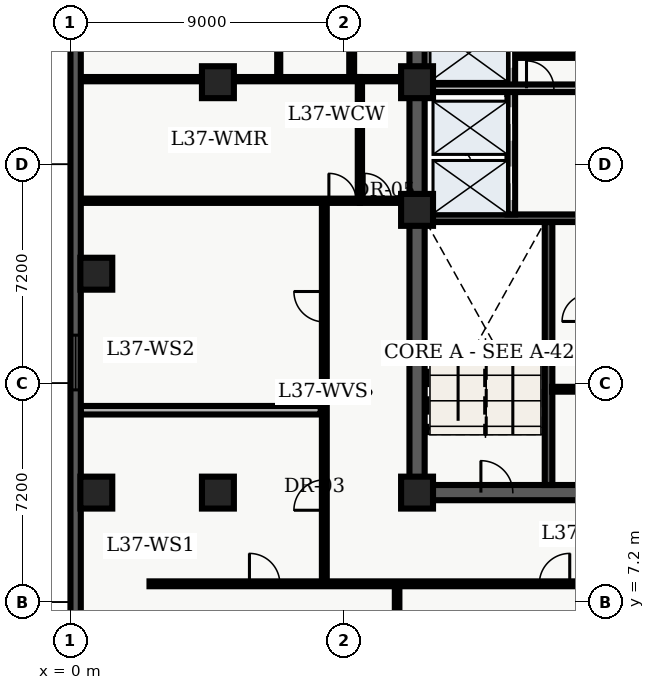
"""IFC4 building model, lengths in metres.
Left out: names, types, materials, properties, quantities, classifications, styles, units other than length and angle.
Written with IfcOpenShell. Run it as: python <this file> out.ifc"""

import sys

from ifc_helpers import new_model, entity, si_unit, converted_unit, direction, frame, origin_with_axes, origin_2d_with_axis, place, context, subcontext, project, spatial, polyline, rectangle, outline, extrude, element, fill, save


model = new_model("IFC4")
c1 = context("Model", 3, precision=1e-05, world=origin_with_axes(), true_north=direction((0.0, 1.0)))
c2 = subcontext(c1, "Body", "Model", "MODEL_VIEW")
j1 = project(units=[si_unit("LENGTHUNIT", "METRE"), converted_unit("PLANEANGLEUNIT", "DEGREE", entity("IfcPlaneAngleMeasure", 0.017), si_unit("PLANEANGLEUNIT", "RADIAN"), dimensions=[0, 0, 0, 0, 0, 0, 0])], contexts=[c1])
p1 = place(None, origin_with_axes())
s1 = spatial("IfcSite", under=j1, at=p1, CompositionType="ELEMENT")
p2 = place(p1, origin_with_axes())
s2 = spatial("IfcBuilding", under=s1, at=p2, CompositionType="ELEMENT")
p3 = place(p2, frame((0.0, 0.0, 152.4), z_axis=(0.0, 0.0, 1.0), x_axis=(1.0, 0.0, 0.0)))
s3 = spatial("IfcBuildingStorey", under=s2, at=p3, CompositionType="ELEMENT", Elevation=152.4)
p4 = place(p3, frame((11.4, 10.8, 0.0), z_axis=(0.0, 0.0, 1.0), x_axis=(0.0, 1.0, 0.0)))
e1 = element("IfcWall", 1, at=p4, inside=s3, PredefinedType="SHEAR", context=c2, shape_type="SweptSolid", body=[
    extrude(outline(polyline([(0.0, -0.25), (27.0, -0.25), (27.0, 0.25), (0.0, 0.25), (0.0, -0.25)])), origin_with_axes(), (0.0, 0.0, 1.0), 3.66),
])
p5 = place(p3, frame((11.4, 10.8, 0.0), z_axis=(0.0, 0.0, 1.0), x_axis=(1.0, 0.0, 0.0)))
e2 = element("IfcWall", 2, at=p5, inside=s3, PredefinedType="SHEAR", context=c2, shape_type="SweptSolid", body=[
    extrude(outline(polyline([(0.0, -0.25), (7.2, -0.25), (7.2, 0.25), (0.0, 0.25), (0.0, -0.25)])), origin_with_axes(), (0.0, 0.0, 1.0), 3.66),
])
p6 = place(p5, frame((2.625, 0.0, 0.0), z_axis=(0.0, 0.0, 1.0), x_axis=(1.0, 0.0, 0.0)))
e3 = element("IfcOpeningElement", 3, at=p6, cuts=e2, PredefinedType="OPENING", context=c2, shape_type="SweptSolid", body=[
    extrude(rectangle(XDim=1.05, YDim=0.52, at=origin_2d_with_axis()), origin_with_axes(), (0.0, 0.0, 1.0), 2.15),
])
p7 = place(p3, frame((15.725, 11.05, 0.0), z_axis=(0.0, 0.0, 1.0), x_axis=(0.0, 1.0, 0.0)))
e4 = element("IfcWall", 4, at=p7, inside=s3, PredefinedType="SHEAR", context=c2, shape_type="SweptSolid", body=[
    extrude(outline(polyline([(0.0, -0.125), (8.65, -0.125), (8.65, 0.125), (0.0, 0.125), (0.0, -0.125)])), origin_with_axes(), (0.0, 0.0, 1.0), 3.66),
])
p8 = place(p3, frame((11.65, 19.825, 0.0), z_axis=(0.0, 0.0, 1.0), x_axis=(1.0, 0.0, 0.0)))
e5 = element("IfcWall", 5, at=p8, inside=s3, PredefinedType="SHEAR", context=c2, shape_type="SweptSolid", body=[
    extrude(outline(polyline([(0.0, -0.125), (6.7, -0.125), (6.7, 0.125), (0.0, 0.125), (0.0, -0.125)])), origin_with_axes(), (0.0, 0.0, 1.0), 3.66),
])
p9 = place(p3, frame((14.5, 19.95, 0.0), z_axis=(0.0, 0.0, 1.0), x_axis=(0.0, 1.0, 0.0)))
e6 = element("IfcWall", 6, at=p9, inside=s3, PredefinedType="SOLIDWALL", context=c2, shape_type="SweptSolid", body=[
    extrude(outline(polyline([(0.0, -0.125), (6.25, -0.125), (6.25, 0.125), (0.0, 0.125), (0.0, -0.125)])), origin_with_axes(), (0.0, 0.0, 1.0), 2.7),
])
p10 = place(p9, frame((1.025, 0.0, 0.0), z_axis=(0.0, 0.0, 1.0), x_axis=(1.0, 0.0, 0.0)))
e7 = element("IfcOpeningElement", 7, at=p10, cuts=e6, PredefinedType="OPENING", context=c2, shape_type="SweptSolid", body=[
    extrude(rectangle(XDim=1.1, YDim=0.27, at=origin_2d_with_axis()), origin_with_axes(), (0.0, 0.0, 1.0), 2.15),
])
p11 = place(p9, frame((2.975, 0.0, 0.0), z_axis=(0.0, 0.0, 1.0), x_axis=(1.0, 0.0, 0.0)))
e8 = element("IfcOpeningElement", 8, at=p11, cuts=e6, PredefinedType="OPENING", context=c2, shape_type="SweptSolid", body=[
    extrude(rectangle(XDim=1.1, YDim=0.27, at=origin_2d_with_axis()), origin_with_axes(), (0.0, 0.0, 1.0), 2.15),
])
p12 = place(p9, frame((5.425, 0.0, 0.0), z_axis=(0.0, 0.0, 1.0), x_axis=(1.0, 0.0, 0.0)))
e9 = element("IfcOpeningElement", 9, at=p12, cuts=e6, PredefinedType="OPENING", context=c2, shape_type="SweptSolid", body=[
    extrude(rectangle(XDim=1.2, YDim=0.27, at=origin_2d_with_axis()), origin_with_axes(), (0.0, 0.0, 1.0), 2.15),
])
p13 = place(p3, frame((11.7, 24.1, 0.0), z_axis=(0.0, 0.0, 1.0), x_axis=(1.0, 0.0, 0.0)))
e10 = element("IfcWall", 10, at=p13, inside=s3, PredefinedType="SOLIDWALL", context=c2, shape_type="SweptSolid", body=[
    extrude(outline(polyline([(0.0, -0.125), (6.6, -0.125), (6.6, 0.125), (0.0, 0.125), (0.0, -0.125)])), origin_with_axes(), (0.0, 0.0, 1.0), 2.7),
])
p14 = place(p13, frame((3.75, 0.0, 0.0), z_axis=(0.0, 0.0, 1.0), x_axis=(1.0, 0.0, 0.0)))
e11 = element("IfcOpeningElement", 11, at=p14, cuts=e10, PredefinedType="OPENING", context=c2, shape_type="SweptSolid", body=[
    extrude(rectangle(XDim=0.9, YDim=0.27, at=origin_2d_with_axis()), origin_with_axes(), (0.0, 0.0, 1.0), 2.15),
])
for number, where, z_axis, x_axis in (
    (12, (11.4, 10.8, 0.0), (0.0, 0.0, 1.0), (1.0, 0.0, 0.0)),
    (13, (11.4, 20.1, 0.0), (0.0, 0.0, 1.0), (1.0, 0.0, 0.0)),
    (14, (11.4, 24.3, 0.0), (0.0, 0.0, 1.0), (1.0, 0.0, 0.0)),
    (15, (4.85, 10.8, 0.0), (0.0, 0.0, 1.0), (1.0, 0.0, 0.0)),
    (16, (4.85, 24.3, 0.0), (0.0, 0.0, 1.0), (1.0, 0.0, 0.0)),
    (17, (0.85, 10.8, 0.0), (0.0, 0.0, 1.0), (1.0, 0.0, 0.0)),
    (18, (0.85, 18.0, 0.0), (0.0, 0.0, 1.0), (1.0, 0.0, 0.0)),
):
    element("IfcColumn", number, at=place(p3, frame(where, z_axis=z_axis, x_axis=x_axis)), inside=s3, PredefinedType="COLUMN", context=c2, shape_type="SweptSolid", body=[
        extrude(rectangle(XDim=1.05, YDim=1.05, at=origin_2d_with_axis()), origin_with_axes(), (0.0, 0.0, 1.0), 3.9),
    ])
p15 = place(p3, frame((14.62, 25.18, 0.0), z_axis=(0.0, 0.0, 1.0), x_axis=(1.0, 0.0, 0.0)))
e19 = element("IfcWall", 19, at=p15, inside=s3, PredefinedType="PARTITIONING", context=c2, shape_type="SweptSolid", body=[
    extrude(outline(polyline([(0.0, -0.08), (3.68, -0.08), (3.68, 0.08), (0.0, 0.08), (0.0, -0.08)])), origin_with_axes(), (0.0, 0.0, 1.0), 2.7),
])
p16 = place(p15, frame((1.95, 0.0, 0.0), z_axis=(0.0, 0.0, 1.0), x_axis=(1.0, 0.0, 0.0)))
e20 = element("IfcOpeningElement", 20, at=p16, cuts=e19, PredefinedType="OPENING", context=c2, shape_type="SweptSolid", body=[
    extrude(rectangle(XDim=0.9, YDim=0.18, at=origin_2d_with_axis()), origin_with_axes(), (0.0, 0.0, 1.0), 2.15),
])
p17 = place(p3, frame((15.84, 14.2, 0.0), z_axis=(0.0, 0.0, 1.0), x_axis=(1.0, 0.0, 0.0)))
e21 = element("IfcWall", 21, at=p17, inside=s3, PredefinedType="PARTITIONING", context=c2, shape_type="SweptSolid", body=[
    extrude(outline(polyline([(0.0, -0.08), (2.46, -0.08), (2.46, 0.08), (0.0, 0.08), (0.0, -0.08)])), origin_with_axes(), (0.0, 0.0, 1.0), 2.7),
])
p18 = place(p3, frame((9.52, 20.4, 0.0), z_axis=(0.0, 0.0, 1.0), x_axis=(0.0, 1.0, 0.0)))
e22 = element("IfcWall", 22, at=p18, inside=s3, PredefinedType="PARTITIONING", context=c2, shape_type="SweptSolid", body=[
    extrude(outline(polyline([(0.0, -0.07), (4.0, -0.07), (4.0, 0.07), (0.0, 0.07), (0.0, -0.07)])), origin_with_axes(), (0.0, 0.0, 1.0), 2.7),
])
p19 = place(p3, frame((9.52, 20.4, 0.0), z_axis=(0.0, 0.0, 1.0), x_axis=(1.0, 0.0, 0.0)))
e23 = element("IfcWall", 23, at=p19, inside=s3, PredefinedType="PARTITIONING", context=c2, shape_type="SweptSolid", body=[
    extrude(outline(polyline([(0.0, -0.07), (1.58, -0.07), (1.58, 0.07), (0.0, 0.07), (0.0, -0.07)])), origin_with_axes(), (0.0, 0.0, 1.0), 2.7),
])
p20 = place(p19, frame((0.59, 0.0, 0.0), z_axis=(0.0, 0.0, 1.0), x_axis=(1.0, 0.0, 0.0)))
e24 = element("IfcOpeningElement", 24, at=p20, cuts=e23, PredefinedType="OPENING", context=c2, shape_type="SweptSolid", body=[
    extrude(rectangle(XDim=0.9, YDim=0.16, at=origin_2d_with_axis()), origin_with_axes(), (0.0, 0.0, 1.0), 2.15),
])
p21 = place(p3, frame((9.52, 24.4, 0.0), z_axis=(0.0, 0.0, 1.0), x_axis=(1.0, 0.0, 0.0)))
e25 = element("IfcWall", 25, at=p21, inside=s3, PredefinedType="PARTITIONING", context=c2, shape_type="SweptSolid", body=[
    extrude(outline(polyline([(0.0, -0.07), (1.58, -0.07), (1.58, 0.07), (0.0, 0.07), (0.0, -0.07)])), origin_with_axes(), (0.0, 0.0, 1.0), 2.7),
])
p22 = place(p3, frame((2.6, 7.8, 0.0), z_axis=(0.0, 0.0, 1.0), x_axis=(1.0, 0.0, 0.0)))
e26 = element("IfcWall", 26, at=p22, inside=s3, PredefinedType="PARTITIONING", context=c2, shape_type="SweptSolid", body=[
    extrude(outline(polyline([(0.0, -0.08), (18.55, -0.08), (18.55, 0.08), (0.0, 0.08), (0.0, -0.08)])), origin_with_axes(), (0.0, 0.0, 1.0), 2.7),
])
p23 = place(p22, frame((3.787, 0.0, 0.0), z_axis=(0.0, 0.0, 1.0), x_axis=(1.0, 0.0, 0.0)))
e27 = element("IfcOpeningElement", 27, at=p23, cuts=e26, PredefinedType="OPENING", context=c2, shape_type="SweptSolid", body=[
    extrude(rectangle(XDim=1.0, YDim=0.18, at=origin_2d_with_axis()), origin_with_axes(), (0.0, 0.0, 1.0), 2.15),
])
p24 = place(p22, frame((13.322, 0.0, 0.0), z_axis=(0.0, 0.0, 1.0), x_axis=(1.0, 0.0, 0.0)))
e28 = element("IfcOpeningElement", 28, at=p24, cuts=e26, PredefinedType="OPENING", context=c2, shape_type="SweptSolid", body=[
    extrude(rectangle(XDim=1.0, YDim=0.18, at=origin_2d_with_axis()), origin_with_axes(), (0.0, 0.0, 1.0), 2.15),
])
p25 = place(p3, frame((8.35, 7.8, 0.0), z_axis=(0.0, 0.0, 1.0), x_axis=(0.0, 1.0, 0.0)))
e29 = element("IfcWall", 29, at=p25, inside=s3, PredefinedType="PARTITIONING", context=c2, shape_type="SweptSolid", body=[
    extrude(outline(polyline([(0.0, -0.08), (12.6, -0.08), (12.6, 0.08), (0.0, 0.08), (0.0, -0.08)])), origin_with_axes(), (0.0, 0.0, 1.0), 2.7),
])
p26 = place(p25, frame((2.92, 0.0, 0.0), z_axis=(0.0, 0.0, 1.0), x_axis=(1.0, 0.0, 0.0)))
e30 = element("IfcOpeningElement", 30, at=p26, cuts=e29, PredefinedType="OPENING", context=c2, shape_type="SweptSolid", body=[
    extrude(rectangle(XDim=1.0, YDim=0.18, at=origin_2d_with_axis()), origin_with_axes(), (0.0, 0.0, 1.0), 2.15),
])
p27 = place(p25, frame((9.115, 0.0, 0.0), z_axis=(0.0, 0.0, 1.0), x_axis=(1.0, 0.0, 0.0)))
e31 = element("IfcOpeningElement", 31, at=p27, cuts=e29, PredefinedType="OPENING", context=c2, shape_type="SweptSolid", body=[
    extrude(rectangle(XDim=1.0, YDim=0.18, at=origin_2d_with_axis()), origin_with_axes(), (0.0, 0.0, 1.0), 2.15),
])
p28 = place(p3, frame((9.25, 24.4, 0.0), z_axis=(0.0, 0.0, 1.0), x_axis=(0.0, 1.0, 0.0)))
e32 = element("IfcWall", 32, at=p28, inside=s3, PredefinedType="PARTITIONING", context=c2, shape_type="SweptSolid", body=[
    extrude(outline(polyline([(0.0, -0.08), (16.1, -0.08), (16.1, 0.08), (0.0, 0.08), (0.0, -0.08)])), origin_with_axes(), (0.0, 0.0, 1.0), 2.7),
])
p29 = place(p28, frame((5.51, 0.0, 0.0), z_axis=(0.0, 0.0, 1.0), x_axis=(1.0, 0.0, 0.0)))
e33 = element("IfcOpeningElement", 33, at=p29, cuts=e32, PredefinedType="OPENING", context=c2, shape_type="SweptSolid", body=[
    extrude(rectangle(XDim=1.0, YDim=0.18, at=origin_2d_with_axis()), origin_with_axes(), (0.0, 0.0, 1.0), 2.15),
])
p30 = place(p28, frame((13.455, 0.0, 0.0), z_axis=(0.0, 0.0, 1.0), x_axis=(1.0, 0.0, 0.0)))
e34 = element("IfcOpeningElement", 34, at=p30, cuts=e32, PredefinedType="OPENING", context=c2, shape_type="SweptSolid", body=[
    extrude(rectangle(XDim=1.0, YDim=0.18, at=origin_2d_with_axis()), origin_with_axes(), (0.0, 0.0, 1.0), 2.15),
])
p31 = place(p3, frame((0.335, 20.4, 0.0), z_axis=(0.0, 0.0, 1.0), x_axis=(1.0, 0.0, 0.0)))
e35 = element("IfcWall", 35, at=p31, inside=s3, PredefinedType="PARTITIONING", context=c2, shape_type="SweptSolid", body=[
    extrude(outline(polyline([(0.0, -0.07), (9.185, -0.07), (9.185, 0.07), (0.0, 0.07), (0.0, -0.07)])), origin_with_axes(), (0.0, 0.0, 1.0), 2.7),
])
p32 = place(p31, frame((8.615, 0.0, 0.0), z_axis=(0.0, 0.0, 1.0), x_axis=(1.0, 0.0, 0.0)))
e36 = element("IfcOpeningElement", 36, at=p32, cuts=e35, PredefinedType="OPENING", context=c2, shape_type="SweptSolid", body=[
    extrude(rectangle(XDim=0.9, YDim=0.16, at=origin_2d_with_axis()), origin_with_axes(), (0.0, 0.0, 1.0), 2.15),
])
p33 = place(p3, frame((0.335, 24.4, 0.0), z_axis=(0.0, 0.0, 1.0), x_axis=(1.0, 0.0, 0.0)))
e37 = element("IfcWall", 37, at=p33, inside=s3, PredefinedType="PARTITIONING", context=c2, shape_type="SweptSolid", body=[
    extrude(outline(polyline([(0.0, -0.07), (9.185, -0.07), (9.185, 0.07), (0.0, 0.07), (0.0, -0.07)])), origin_with_axes(), (0.0, 0.0, 1.0), 2.7),
])
p34 = place(p3, frame((0.335, 13.51, 0.0), z_axis=(0.0, 0.0, 1.0), x_axis=(1.0, 0.0, 0.0)))
e38 = element("IfcWall", 38, at=p34, inside=s3, PredefinedType="PARTITIONING", context=c2, shape_type="SweptSolid", body=[
    extrude(outline(polyline([(0.0, -0.14), (7.895, -0.14), (7.895, 0.14), (0.0, 0.14), (0.0, -0.14)])), origin_with_axes(), (0.0, 0.0, 1.0), 2.7),
])
p35 = place(p3, frame((6.85, 24.55, 0.0), z_axis=(0.0, 0.0, 1.0), x_axis=(0.0, 1.0, 0.0)))
e39 = element("IfcWall", 39, at=p35, inside=s3, PredefinedType="PARTITIONING", context=c2, shape_type="SweptSolid", body=[
    extrude(outline(polyline([(0.0, -0.05), (15.75, -0.05), (15.75, 0.05), (0.0, 0.05), (0.0, -0.05)])), origin_with_axes(), (0.0, 0.0, 1.0), 2.7),
])
p36 = place(p35, frame((5.36, 0.0, 0.0), z_axis=(0.0, 0.0, 1.0), x_axis=(1.0, 0.0, 0.0)))
e40 = element("IfcOpeningElement", 40, at=p36, cuts=e39, PredefinedType="OPENING", context=c2, shape_type="SweptSolid", body=[
    extrude(rectangle(XDim=0.95, YDim=0.12, at=origin_2d_with_axis()), origin_with_axes(), (0.0, 0.0, 1.0), 2.15),
])
p37 = place(p35, frame((14.555, 0.0, 0.0), z_axis=(0.0, 0.0, 1.0), x_axis=(1.0, 0.0, 0.0)))
e41 = element("IfcOpeningElement", 41, at=p37, cuts=e39, PredefinedType="OPENING", context=c2, shape_type="SweptSolid", body=[
    extrude(rectangle(XDim=0.95, YDim=0.12, at=origin_2d_with_axis()), origin_with_axes(), (0.0, 0.0, 1.0), 2.15),
])
p38 = place(p3, frame((10.744, 0.335, 0.0), z_axis=(0.0, 0.0, 1.0), x_axis=(0.0, 1.0, 0.0)))
e42 = element("IfcWall", 42, at=p38, inside=s3, PredefinedType="PARTITIONING", context=c2, shape_type="SweptSolid", body=[
    extrude(outline(polyline([(0.0, -0.075), (7.365, -0.075), (7.365, 0.075), (0.0, 0.075), (0.0, -0.075)])), origin_with_axes(), (0.0, 0.0, 1.0), 2.7),
])
p39 = place(p3, frame((0.17, 2.74, 0.0), z_axis=(0.0, 0.0, 1.0), x_axis=(0.0, 1.0, 0.0)))
e43 = element("IfcWall", 43, at=p39, inside=s3, PredefinedType="SOLIDWALL", context=c2, shape_type="SweptSolid", body=[
    extrude(outline(polyline([(0.0, -0.17), (43.46, -0.17), (43.46, 0.17), (0.0, 0.17), (0.0, -0.17)])), origin_with_axes(), (0.0, 0.0, 1.0), 3.66),
])
p40 = place(p39, frame((2.948, 0.0, 0.45), z_axis=(0.0, 0.0, 1.0), x_axis=(1.0, 0.0, 0.0)))
e44 = element("IfcOpeningElement", 44, at=p40, cuts=e43, PredefinedType="OPENING", context=c2, shape_type="SweptSolid", body=[
    extrude(rectangle(XDim=1.8, YDim=0.36, at=origin_2d_with_axis()), origin_with_axes(), (0.0, 0.0, 1.0), 2.1),
])
p41 = place(p39, frame((12.339, 0.0, 0.45), z_axis=(0.0, 0.0, 1.0), x_axis=(1.0, 0.0, 0.0)))
e45 = element("IfcOpeningElement", 45, at=p41, cuts=e43, PredefinedType="OPENING", context=c2, shape_type="SweptSolid", body=[
    extrude(rectangle(XDim=1.8, YDim=0.36, at=origin_2d_with_axis()), origin_with_axes(), (0.0, 0.0, 1.0), 2.1),
])
p42 = place(p39, frame((26.426, 0.0, 0.45), z_axis=(0.0, 0.0, 1.0), x_axis=(1.0, 0.0, 0.0)))
e46 = element("IfcOpeningElement", 46, at=p42, cuts=e43, PredefinedType="OPENING", context=c2, shape_type="SweptSolid", body=[
    extrude(rectangle(XDim=1.8, YDim=0.36, at=origin_2d_with_axis()), origin_with_axes(), (0.0, 0.0, 1.0), 2.1),
])
p43 = place(p39, frame((31.121, 0.0, 0.45), z_axis=(0.0, 0.0, 1.0), x_axis=(1.0, 0.0, 0.0)))
e47 = element("IfcOpeningElement", 47, at=p43, cuts=e43, PredefinedType="OPENING", context=c2, shape_type="SweptSolid", body=[
    extrude(rectangle(XDim=1.8, YDim=0.36, at=origin_2d_with_axis()), origin_with_axes(), (0.0, 0.0, 1.0), 2.1),
])
p44 = place(p39, frame((40.062, 0.0, 0.45), z_axis=(0.0, 0.0, 1.0), x_axis=(1.0, 0.0, 0.0)))
e48 = element("IfcOpeningElement", 48, at=p44, cuts=e43, PredefinedType="OPENING", context=c2, shape_type="SweptSolid", body=[
    extrude(rectangle(XDim=1.8, YDim=0.36, at=origin_2d_with_axis()), origin_with_axes(), (0.0, 0.0, 1.0), 2.1),
])
p45 = place(p9, frame((1.025, 0.0, 0.0), z_axis=(0.0, 0.0, 1.0), x_axis=(1.0, 0.0, 0.0)))
e49 = element("IfcDoor", 49, at=p45, inside=s3, OperationType="SLIDING_TO_LEFT", PredefinedType="DOOR", context=c2, shape_type="SweptSolid", body=[
    extrude(rectangle(XDim=1.1, YDim=0.09, at=origin_2d_with_axis()), origin_with_axes(), (0.0, 0.0, 1.0), 2.15),
])
fill(e7, e49)
p46 = place(p9, frame((2.975, 0.0, 0.0), z_axis=(0.0, 0.0, 1.0), x_axis=(1.0, 0.0, 0.0)))
e50 = element("IfcDoor", 50, at=p46, inside=s3, OperationType="SLIDING_TO_RIGHT", PredefinedType="DOOR", context=c2, shape_type="SweptSolid", body=[
    extrude(rectangle(XDim=1.1, YDim=0.09, at=origin_2d_with_axis()), origin_with_axes(), (0.0, 0.0, 1.0), 2.15),
])
fill(e8, e50)
p47 = place(p9, frame((5.425, 0.0, 0.0), z_axis=(0.0, 0.0, 1.0), x_axis=(1.0, 0.0, 0.0)))
e51 = element("IfcDoor", 51, at=p47, inside=s3, OperationType="DOUBLE_DOOR_SLIDING", PredefinedType="DOOR", context=c2, shape_type="SweptSolid", body=[
    extrude(rectangle(XDim=1.2, YDim=0.09, at=origin_2d_with_axis()), origin_with_axes(), (0.0, 0.0, 1.0), 2.15),
])
fill(e9, e51)
p48 = place(p5, frame((2.625, 0.0, 0.0), z_axis=(0.0, 0.0, 1.0), x_axis=(1.0, 0.0, 0.0)))
e52 = element("IfcDoor", 52, at=p48, inside=s3, OperationType="SINGLE_SWING_LEFT", PredefinedType="DOOR", context=c2, shape_type="SweptSolid", body=[
    extrude(rectangle(XDim=1.05, YDim=0.09, at=origin_2d_with_axis()), origin_with_axes(), (0.0, 0.0, 1.0), 2.15),
])
fill(e3, e52)
p49 = place(p13, frame((3.75, 0.0, 0.0), z_axis=(0.0, 0.0, 1.0), x_axis=(1.0, 0.0, 0.0)))
e53 = element("IfcDoor", 53, at=p49, inside=s3, OperationType="SINGLE_SWING_LEFT", PredefinedType="DOOR", context=c2, shape_type="SweptSolid", body=[
    extrude(rectangle(XDim=0.9, YDim=0.09, at=origin_2d_with_axis()), origin_with_axes(), (0.0, 0.0, 1.0), 2.15),
])
fill(e11, e53)
p50 = place(p15, frame((1.95, 0.0, 0.0), z_axis=(0.0, 0.0, 1.0), x_axis=(1.0, 0.0, 0.0)))
e54 = element("IfcDoor", 54, at=p50, inside=s3, OperationType="SINGLE_SWING_LEFT", PredefinedType="DOOR", context=c2, shape_type="SweptSolid", body=[
    extrude(rectangle(XDim=0.9, YDim=0.09, at=origin_2d_with_axis()), origin_with_axes(), (0.0, 0.0, 1.0), 2.15),
])
fill(e20, e54)
p51 = place(p19, frame((0.59, 0.0, 0.0), z_axis=(0.0, 0.0, 1.0), x_axis=(1.0, 0.0, 0.0)))
e55 = element("IfcDoor", 55, at=p51, inside=s3, OperationType="SINGLE_SWING_LEFT", PredefinedType="DOOR", context=c2, shape_type="SweptSolid", body=[
    extrude(rectangle(XDim=0.9, YDim=0.084, at=origin_2d_with_axis()), origin_with_axes(), (0.0, 0.0, 1.0), 2.15),
])
fill(e24, e55)
p52 = place(p31, frame((8.615, 0.0, 0.0), z_axis=(0.0, 0.0, 1.0), x_axis=(1.0, 0.0, 0.0)))
e56 = element("IfcDoor", 56, at=p52, inside=s3, OperationType="SINGLE_SWING_LEFT", PredefinedType="DOOR", context=c2, shape_type="SweptSolid", body=[
    extrude(rectangle(XDim=0.9, YDim=0.084, at=origin_2d_with_axis()), origin_with_axes(), (0.0, 0.0, 1.0), 2.15),
])
fill(e36, e56)
p53 = place(p25, frame((2.92, 0.0, 0.0), z_axis=(0.0, 0.0, 1.0), x_axis=(1.0, 0.0, 0.0)))
e57 = element("IfcDoor", 57, at=p53, inside=s3, OperationType="SINGLE_SWING_LEFT", PredefinedType="DOOR", context=c2, shape_type="SweptSolid", body=[
    extrude(rectangle(XDim=1.0, YDim=0.09, at=origin_2d_with_axis()), origin_with_axes(), (0.0, 0.0, 1.0), 2.15),
])
fill(e30, e57)
p54 = place(p25, frame((9.115, 0.0, 0.0), z_axis=(0.0, 0.0, 1.0), x_axis=(1.0, 0.0, 0.0)))
e58 = element("IfcDoor", 58, at=p54, inside=s3, OperationType="SINGLE_SWING_RIGHT", PredefinedType="DOOR", context=c2, shape_type="SweptSolid", body=[
    extrude(rectangle(XDim=1.0, YDim=0.09, at=origin_2d_with_axis()), origin_with_axes(), (0.0, 0.0, 1.0), 2.15),
])
fill(e31, e58)
p55 = place(p22, frame((3.787, 0.0, 0.0), z_axis=(0.0, 0.0, 1.0), x_axis=(1.0, 0.0, 0.0)))
e59 = element("IfcDoor", 59, at=p55, inside=s3, OperationType="SINGLE_SWING_LEFT", PredefinedType="DOOR", context=c2, shape_type="SweptSolid", body=[
    extrude(rectangle(XDim=1.0, YDim=0.09, at=origin_2d_with_axis()), origin_with_axes(), (0.0, 0.0, 1.0), 2.15),
])
fill(e27, e59)
p56 = place(p22, frame((13.322, 0.0, 0.0), z_axis=(0.0, 0.0, 1.0), x_axis=(1.0, 0.0, 0.0)))
e60 = element("IfcDoor", 60, at=p56, inside=s3, OperationType="SINGLE_SWING_RIGHT", PredefinedType="DOOR", context=c2, shape_type="SweptSolid", body=[
    extrude(rectangle(XDim=1.0, YDim=0.09, at=origin_2d_with_axis()), origin_with_axes(), (0.0, 0.0, 1.0), 2.15),
])
fill(e28, e60)
p57 = place(p39, frame((12.339, 0.0, 0.45), z_axis=(0.0, 0.0, 1.0), x_axis=(1.0, 0.0, 0.0)))
e61 = element("IfcWindow", 61, at=p57, inside=s3, PredefinedType="WINDOW", context=c2, shape_type="SweptSolid", body=[
    extrude(rectangle(XDim=1.8, YDim=0.09, at=origin_2d_with_axis()), origin_with_axes(), (0.0, 0.0, 1.0), 2.1),
])
fill(e45, e61)
save(model, sys.argv[1])
